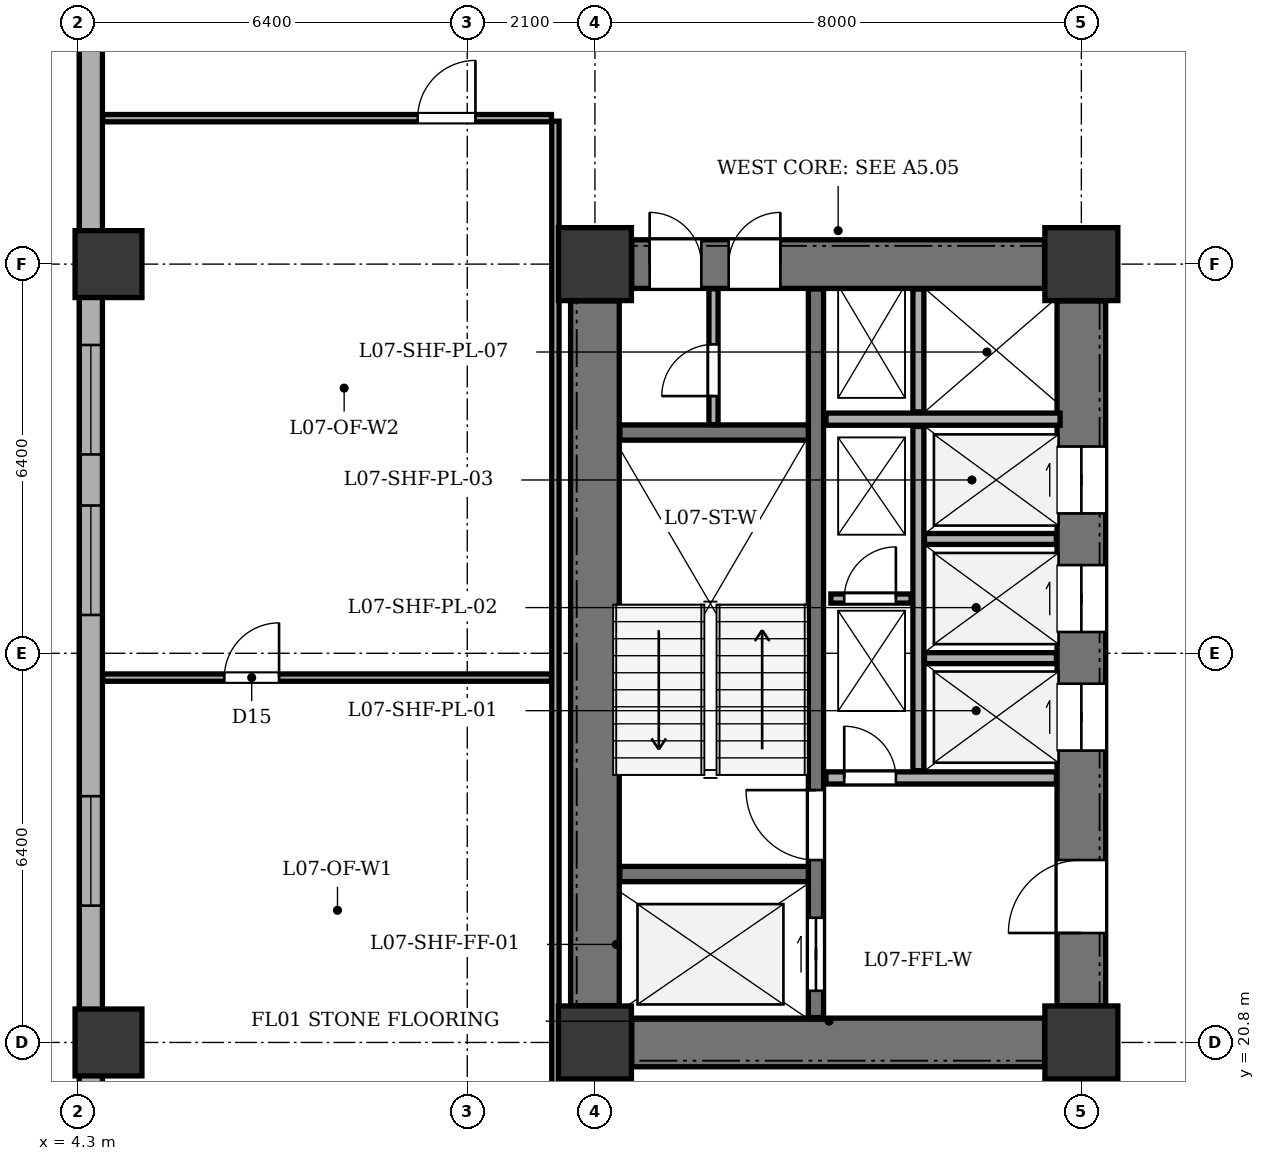
"""IFC4 building model, lengths in metres.
Left out: names, types, materials, properties, quantities, classifications, styles, units other than length and angle.
Written with IfcOpenShell. Run it as: python <this file> out.ifc"""

import sys

from ifc_helpers import new_model, si_unit, direction, frame, frame_2d, origin, origin_2d, place, context, subcontext, project, spatial, rectangle, extrude, element, fill, save


model = new_model("IFC4")
c1 = context("Model", 3, precision=1e-05, world=origin(), true_north=direction((0.0, 1.0)))
c2 = subcontext(c1, "Body", "Model", "MODEL_VIEW")
j1 = project(units=[si_unit("LENGTHUNIT", "METRE"), si_unit("PLANEANGLEUNIT", "RADIAN")], contexts=[c1])
p1 = place(None, origin())
s1 = spatial("IfcSite", under=j1, at=p1, CompositionType="ELEMENT")
p2 = place(p1, origin())
s2 = spatial("IfcBuilding", under=s1, at=p2, CompositionType="ELEMENT")
p3 = place(p2, frame((0.0, 0.0, 32.1)))
s3 = spatial("IfcBuildingStorey", under=s2, at=p3, CompositionType="ELEMENT", Elevation=32.1)
for number, where, z_axis, x_axis in (
    (1, (12.8, 20.8, 0.0), (0.0, 0.0, 1.0), (1.0, 0.0, 0.0)),
    (2, (20.8, 20.8, 0.0), (0.0, 0.0, 1.0), (1.0, 0.0, 0.0)),
    (3, (12.8, 33.6, 0.0), (0.0, 0.0, 1.0), (1.0, 0.0, 0.0)),
    (4, (20.8, 33.6, 0.0), (0.0, 0.0, 1.0), (1.0, 0.0, 0.0)),
):
    element("IfcColumn", number, at=place(p3, frame(where, z_axis=z_axis, x_axis=x_axis)), inside=s3, PredefinedType="COLUMN", context=c2, shape_type="SweptSolid", body=[
        extrude(rectangle(XDim=1.2, YDim=1.2, at=origin_2d()), origin(), (0.0, 0.0, 1.0), 3.9),
    ])
for number, where, z_axis, x_axis in (
    (5, (4.8, 20.8, 0.0), (0.0, 0.0, 1.0), (1.0, 0.0, 0.0)),
    (6, (4.8, 33.6, 0.0), (0.0, 0.0, 1.0), (1.0, 0.0, 0.0)),
):
    element("IfcColumn", number, at=place(p3, frame(where, z_axis=z_axis, x_axis=x_axis)), inside=s3, PredefinedType="COLUMN", context=c2, shape_type="SweptSolid", body=[
        extrude(rectangle(XDim=1.1, YDim=1.1, at=origin_2d()), origin(), (0.0, 0.0, 1.0), 3.9),
    ])
p4 = place(p3, frame((4.51, 6.5, 0.0), z_axis=(0.0, 0.0, 1.0), x_axis=(0.0, 1.0, 0.0)))
e7 = element("IfcWall", 7, at=p4, inside=s3, PredefinedType="STANDARD", context=c2, shape_type="SweptSolid", body=[
    extrude(rectangle(XDim=35.0, YDim=0.38, at=frame_2d((17.5, 0.0))), origin(), (0.0, 0.0, 1.0), 3.135),
])
p5 = place(p4, frame((2.693, 0.0, 0.8)))
e8 = element("IfcOpeningElement", 8, at=p5, cuts=e7, PredefinedType="OPENING", context=c2, shape_type="SweptSolid", body=[
    extrude(rectangle(XDim=1.8, YDim=1.9, at=frame_2d((0.9, 0.95))), frame((0.0, 0.2, 0.0), z_axis=(0.0, -1.0, 0.0), x_axis=(1.0, 0.0, 0.0)), (0.0, 0.0, 1.0), 0.4),
])
p6 = place(p4, frame((7.457, 0.0, 0.8)))
e9 = element("IfcOpeningElement", 9, at=p6, cuts=e7, PredefinedType="OPENING", context=c2, shape_type="SweptSolid", body=[
    extrude(rectangle(XDim=2.4, YDim=1.9, at=frame_2d((1.2, 0.95))), frame((0.0, 0.2, 0.0), z_axis=(0.0, -1.0, 0.0), x_axis=(1.0, 0.0, 0.0)), (0.0, 0.0, 1.0), 0.4),
])
p7 = place(p4, frame((16.55, 0.0, 0.8)))
e10 = element("IfcOpeningElement", 10, at=p7, cuts=e7, PredefinedType="OPENING", context=c2, shape_type="SweptSolid", body=[
    extrude(rectangle(XDim=1.8, YDim=1.9, at=frame_2d((0.9, 0.95))), frame((0.0, 0.2, 0.0), z_axis=(0.0, -1.0, 0.0), x_axis=(1.0, 0.0, 0.0)), (0.0, 0.0, 1.0), 0.4),
])
p8 = place(p4, frame((21.33, 0.0, 0.8)))
e11 = element("IfcOpeningElement", 11, at=p8, cuts=e7, PredefinedType="OPENING", context=c2, shape_type="SweptSolid", body=[
    extrude(rectangle(XDim=1.8, YDim=1.9, at=frame_2d((0.9, 0.95))), frame((0.0, 0.2, 0.0), z_axis=(0.0, -1.0, 0.0), x_axis=(1.0, 0.0, 0.0)), (0.0, 0.0, 1.0), 0.4),
])
p9 = place(p4, frame((23.97, 0.0, 0.8)))
e12 = element("IfcOpeningElement", 12, at=p9, cuts=e7, PredefinedType="OPENING", context=c2, shape_type="SweptSolid", body=[
    extrude(rectangle(XDim=1.8, YDim=1.9, at=frame_2d((0.9, 0.95))), frame((0.0, 0.2, 0.0), z_axis=(0.0, -1.0, 0.0), x_axis=(1.0, 0.0, 0.0)), (0.0, 0.0, 1.0), 0.4),
])
p10 = place(p4, frame((31.175, 0.0, 0.8)))
e13 = element("IfcOpeningElement", 13, at=p10, cuts=e7, PredefinedType="OPENING", context=c2, shape_type="SweptSolid", body=[
    extrude(rectangle(XDim=1.8, YDim=1.9, at=frame_2d((0.9, 0.95))), frame((0.0, 0.2, 0.0), z_axis=(0.0, -1.0, 0.0), x_axis=(1.0, 0.0, 0.0)), (0.0, 0.0, 1.0), 0.4),
])
p11 = place(p3, frame((12.8, 21.405, 0.0), z_axis=(0.0, 0.0, 1.0), x_axis=(0.0, 1.0, 0.0)))
e14 = element("IfcWall", 14, at=p11, inside=s3, PredefinedType="SHEAR", context=c2, shape_type="SweptSolid", body=[
    extrude(rectangle(XDim=11.59, YDim=0.8, at=frame_2d((5.795, 0.0))), origin(), (0.0, 0.0, 1.0), 3.6),
])
p12 = place(p3, frame((13.405, 20.8, 0.0), z_axis=(0.0, 0.0, 1.0), x_axis=(1.0, 0.0, 0.0)))
e15 = element("IfcWall", 15, at=p12, inside=s3, PredefinedType="SHEAR", context=c2, shape_type="SweptSolid", body=[
    extrude(rectangle(XDim=6.79, YDim=0.8, at=frame_2d((3.395, 0.0))), origin(), (0.0, 0.0, 1.0), 3.6),
])
p13 = place(p3, frame((13.405, 33.6, 0.0), z_axis=(0.0, 0.0, 1.0), x_axis=(1.0, 0.0, 0.0)))
e16 = element("IfcWall", 16, at=p13, inside=s3, PredefinedType="SHEAR", context=c2, shape_type="SweptSolid", body=[
    extrude(rectangle(XDim=6.79, YDim=0.8, at=frame_2d((3.395, 0.0))), origin(), (0.0, 0.0, 1.0), 3.6),
])
p14 = place(p13, frame((0.295, 0.0, 0.0)))
e17 = element("IfcOpeningElement", 17, at=p14, cuts=e16, PredefinedType="OPENING", context=c2, shape_type="SweptSolid", body=[
    extrude(rectangle(XDim=0.85, YDim=2.02, at=frame_2d((0.425, 1.01))), frame((0.0, 0.41, 0.0), z_axis=(0.0, -1.0, 0.0), x_axis=(1.0, 0.0, 0.0)), (0.0, 0.0, 1.0), 0.82),
])
p15 = place(p13, frame((1.595, 0.0, 0.0)))
e18 = element("IfcOpeningElement", 18, at=p15, cuts=e16, PredefinedType="OPENING", context=c2, shape_type="SweptSolid", body=[
    extrude(rectangle(XDim=0.85, YDim=2.02, at=frame_2d((0.425, 1.01))), frame((0.0, 0.41, 0.0), z_axis=(0.0, -1.0, 0.0), x_axis=(1.0, 0.0, 0.0)), (0.0, 0.0, 1.0), 0.82),
])
p16 = place(p3, frame((20.8, 21.405, 0.0), z_axis=(0.0, 0.0, 1.0), x_axis=(0.0, 1.0, 0.0)))
e19 = element("IfcWall", 19, at=p16, inside=s3, PredefinedType="SHEAR", context=c2, shape_type="SweptSolid", body=[
    extrude(rectangle(XDim=11.59, YDim=0.8, at=frame_2d((5.795, 0.0))), origin(), (0.0, 0.0, 1.0), 3.6),
])
p17 = place(p16, frame((1.195, 0.0, 0.0)))
e20 = element("IfcOpeningElement", 20, at=p17, cuts=e19, PredefinedType="OPENING", context=c2, shape_type="SweptSolid", body=[
    extrude(rectangle(XDim=1.2, YDim=2.15, at=frame_2d((0.6, 1.075))), frame((0.0, 0.41, 0.0), z_axis=(0.0, -1.0, 0.0), x_axis=(1.0, 0.0, 0.0)), (0.0, 0.0, 1.0), 0.82),
])
p18 = place(p16, frame((4.195, 0.0, 0.0)))
e21 = element("IfcOpeningElement", 21, at=p18, cuts=e19, PredefinedType="OPENING", context=c2, shape_type="SweptSolid", body=[
    extrude(rectangle(XDim=1.1, YDim=2.1, at=frame_2d((0.55, 1.05))), frame((0.0, 0.41, 0.0), z_axis=(0.0, -1.0, 0.0), x_axis=(1.0, 0.0, 0.0)), (0.0, 0.0, 1.0), 0.82),
])
p19 = place(p16, frame((6.145, 0.0, 0.0)))
e22 = element("IfcOpeningElement", 22, at=p19, cuts=e19, PredefinedType="OPENING", context=c2, shape_type="SweptSolid", body=[
    extrude(rectangle(XDim=1.1, YDim=2.1, at=frame_2d((0.55, 1.05))), frame((0.0, 0.41, 0.0), z_axis=(0.0, -1.0, 0.0), x_axis=(1.0, 0.0, 0.0)), (0.0, 0.0, 1.0), 0.82),
])
p20 = place(p16, frame((8.095, 0.0, 0.0)))
e23 = element("IfcOpeningElement", 23, at=p20, cuts=e19, PredefinedType="OPENING", context=c2, shape_type="SweptSolid", body=[
    extrude(rectangle(XDim=1.1, YDim=2.1, at=frame_2d((0.55, 1.05))), frame((0.0, 0.41, 0.0), z_axis=(0.0, -1.0, 0.0), x_axis=(1.0, 0.0, 0.0)), (0.0, 0.0, 1.0), 0.82),
])
p21 = place(p3, frame((16.435, 21.21, 0.0), z_axis=(0.0, 0.0, 1.0), x_axis=(0.0, 1.0, 0.0)))
e24 = element("IfcWall", 24, at=p21, inside=s3, PredefinedType="SHEAR", context=c2, shape_type="SweptSolid", body=[
    extrude(rectangle(XDim=11.98, YDim=0.25, at=frame_2d((5.99, 0.0))), origin(), (0.0, 0.0, 1.0), 3.6),
])
p22 = place(p21, frame((0.44, 0.0, 0.0)))
e25 = element("IfcOpeningElement", 25, at=p22, cuts=e24, PredefinedType="OPENING", context=c2, shape_type="SweptSolid", body=[
    extrude(rectangle(XDim=1.2, YDim=2.15, at=frame_2d((0.6, 1.075))), frame((0.0, 0.135, 0.0), z_axis=(0.0, -1.0, 0.0), x_axis=(1.0, 0.0, 0.0)), (0.0, 0.0, 1.0), 0.27),
])
p23 = place(p21, frame((2.59, 0.0, 0.0)))
e26 = element("IfcOpeningElement", 26, at=p23, cuts=e24, PredefinedType="OPENING", context=c2, shape_type="SweptSolid", body=[
    extrude(rectangle(XDim=1.15, YDim=2.15, at=frame_2d((0.575, 1.075))), frame((0.0, 0.135, 0.0), z_axis=(0.0, -1.0, 0.0), x_axis=(1.0, 0.0, 0.0)), (0.0, 0.0, 1.0), 0.27),
])
for number, where, z_axis, x_axis in (
    (27, (13.21, 23.57, 0.0), (0.0, 0.0, 1.0), (1.0, 0.0, 0.0)),
    (28, (13.21, 30.83, 0.0), (0.0, 0.0, 1.0), (1.0, 0.0, 0.0)),
):
    element("IfcWall", number, at=place(p3, frame(where, z_axis=z_axis, x_axis=x_axis)), inside=s3, PredefinedType="SHEAR", context=c2, shape_type="SweptSolid", body=[
        extrude(rectangle(XDim=3.1, YDim=0.25, at=frame_2d((1.55, 0.0))), origin(), (0.0, 0.0, 1.0), 3.6),
    ])
p24 = place(p3, frame((16.6, 25.15, 0.0), z_axis=(0.0, 0.0, 1.0), x_axis=(1.0, 0.0, 0.0)))
e29 = element("IfcWall", 29, at=p24, inside=s3, PredefinedType="SOLIDWALL", context=c2, shape_type="SweptSolid", body=[
    extrude(rectangle(XDim=3.79, YDim=0.2, at=frame_2d((1.895, 0.0))), origin(), (0.0, 0.0, 1.0), 3.6),
])
p25 = place(p24, frame((0.3, 0.0, 0.0)))
e30 = element("IfcOpeningElement", 30, at=p25, cuts=e29, PredefinedType="OPENING", context=c2, shape_type="SweptSolid", body=[
    extrude(rectangle(XDim=0.85, YDim=2.02, at=frame_2d((0.425, 1.01))), frame((0.0, 0.11, 0.0), z_axis=(0.0, -1.0, 0.0), x_axis=(1.0, 0.0, 0.0)), (0.0, 0.0, 1.0), 0.22),
])
p26 = place(p3, frame((16.6, 31.05, 0.0), z_axis=(0.0, 0.0, 1.0), x_axis=(1.0, 0.0, 0.0)))
e31 = element("IfcWall", 31, at=p26, inside=s3, PredefinedType="SOLIDWALL", context=c2, shape_type="SweptSolid", body=[
    extrude(rectangle(XDim=3.85, YDim=0.2, at=frame_2d((1.925, 0.0))), origin(), (0.0, 0.0, 1.0), 3.6),
])
p27 = place(p3, frame((18.12, 25.27, 0.0), z_axis=(0.0, 0.0, 1.0), x_axis=(0.0, 1.0, 0.0)))
e32 = element("IfcWall", 32, at=p27, inside=s3, PredefinedType="PARTITIONING", context=c2, shape_type="SweptSolid", body=[
    extrude(rectangle(XDim=5.66, YDim=0.18, at=frame_2d((2.83, 0.0))), origin(), (0.0, 0.0, 1.0), 3.6),
])
p28 = place(p3, frame((18.12, 31.17, 0.0), z_axis=(0.0, 0.0, 1.0), x_axis=(0.0, 1.0, 0.0)))
e33 = element("IfcWall", 33, at=p28, inside=s3, PredefinedType="PARTITIONING", context=c2, shape_type="SweptSolid", body=[
    extrude(rectangle(XDim=2.02, YDim=0.18, at=frame_2d((1.01, 0.0))), origin(), (0.0, 0.0, 1.0), 3.6),
])
for number, where, z_axis, x_axis in (
    (34, (18.22, 27.12, 0.0), (0.0, 0.0, 1.0), (1.0, 0.0, 0.0)),
    (35, (18.22, 29.08, 0.0), (0.0, 0.0, 1.0), (1.0, 0.0, 0.0)),
):
    element("IfcWall", number, at=place(p3, frame(where, z_axis=z_axis, x_axis=x_axis)), inside=s3, PredefinedType="PARTITIONING", context=c2, shape_type="SweptSolid", body=[
        extrude(rectangle(XDim=2.17, YDim=0.18, at=frame_2d((1.085, 0.0))), origin(), (0.0, 0.0, 1.0), 3.6),
    ])
p29 = place(p3, frame((14.75, 30.96, 0.0), z_axis=(0.0, 0.0, 1.0), x_axis=(0.0, 1.0, 0.0)))
e36 = element("IfcWall", 36, at=p29, inside=s3, PredefinedType="PARTITIONING", context=c2, shape_type="SweptSolid", body=[
    extrude(rectangle(XDim=2.235, YDim=0.15, at=frame_2d((1.118, 0.0))), origin(), (0.0, 0.0, 1.0), 3.6),
])
p30 = place(p29, frame((0.47, 0.0, 0.0)))
e37 = element("IfcOpeningElement", 37, at=p30, cuts=e36, PredefinedType="OPENING", context=c2, shape_type="SweptSolid", body=[
    extrude(rectangle(XDim=0.85, YDim=2.02, at=frame_2d((0.425, 1.01))), frame((0.0, 0.085, 0.0), z_axis=(0.0, -1.0, 0.0), x_axis=(1.0, 0.0, 0.0)), (0.0, 0.0, 1.0), 0.17),
])
p31 = place(p3, frame((16.68, 28.1, 0.0), z_axis=(0.0, 0.0, 1.0), x_axis=(1.0, 0.0, 0.0)))
e38 = element("IfcWall", 38, at=p31, inside=s3, PredefinedType="PARTITIONING", context=c2, shape_type="SweptSolid", body=[
    extrude(rectangle(XDim=1.32, YDim=0.15, at=frame_2d((0.66, 0.0))), origin(), (0.0, 0.0, 1.0), 3.6),
])
p32 = place(p31, frame((0.22, 0.0, 0.0)))
e39 = element("IfcOpeningElement", 39, at=p32, cuts=e38, PredefinedType="OPENING", context=c2, shape_type="SweptSolid", body=[
    extrude(rectangle(XDim=0.85, YDim=2.02, at=frame_2d((0.425, 1.01))), frame((0.0, 0.085, 0.0), z_axis=(0.0, -1.0, 0.0), x_axis=(1.0, 0.0, 0.0)), (0.0, 0.0, 1.0), 0.17),
])
p33 = place(p3, frame((12.15, 18.45, 0.0), z_axis=(0.0, 0.0, 1.0), x_axis=(0.0, 1.0, 0.0)))
e40 = element("IfcWall", 40, at=p33, inside=s3, PredefinedType="PARTITIONING", context=c2, shape_type="SweptSolid", body=[
    extrude(rectangle(XDim=17.5, YDim=0.12, at=frame_2d((8.75, 0.0))), origin(), (0.0, 0.0, 1.0), 3.6),
])
p34 = place(p3, frame((4.705, 36.0, 0.0), z_axis=(0.0, 0.0, 1.0), x_axis=(1.0, 0.0, 0.0)))
e41 = element("IfcWall", 41, at=p34, inside=s3, PredefinedType="PARTITIONING", context=c2, shape_type="SweptSolid", body=[
    extrude(rectangle(XDim=7.38, YDim=0.12, at=frame_2d((3.69, 0.0))), origin(), (0.0, 0.0, 1.0), 3.6),
])
p35 = place(p34, frame((5.18, 0.0, 0.0)))
e42 = element("IfcOpeningElement", 42, at=p35, cuts=e41, PredefinedType="OPENING", context=c2, shape_type="SweptSolid", body=[
    extrude(rectangle(XDim=0.95, YDim=2.1, at=frame_2d((0.475, 1.05))), frame((0.0, 0.07, 0.0), z_axis=(0.0, -1.0, 0.0), x_axis=(1.0, 0.0, 0.0)), (0.0, 0.0, 1.0), 0.14),
])
p36 = place(p3, frame((4.705, 26.8, 0.0), z_axis=(0.0, 0.0, 1.0), x_axis=(1.0, 0.0, 0.0)))
e43 = element("IfcWall", 43, at=p36, inside=s3, PredefinedType="PARTITIONING", context=c2, shape_type="SweptSolid", body=[
    extrude(rectangle(XDim=7.38, YDim=0.12, at=frame_2d((3.69, 0.0))), origin(), (0.0, 0.0, 1.0), 3.6),
])
p37 = place(p36, frame((2.0, 0.0, 0.0)))
e44 = element("IfcOpeningElement", 44, at=p37, cuts=e43, PredefinedType="OPENING", context=c2, shape_type="SweptSolid", body=[
    extrude(rectangle(XDim=0.9, YDim=2.05, at=frame_2d((0.45, 1.025))), frame((0.0, 0.07, 0.0), z_axis=(0.0, -1.0, 0.0), x_axis=(1.0, 0.0, 0.0)), (0.0, 0.0, 1.0), 0.14),
])
p38 = place(p7, origin())
e45 = element("IfcWindow", 45, at=p38, inside=s3, PartitioningType="SINGLE_PANEL", PredefinedType="WINDOW", context=c2, shape_type="SweptSolid", body=[
    extrude(rectangle(XDim=1.8, YDim=1.9, at=frame_2d((0.9, 0.95))), frame((0.0, -0.01, 0.0), z_axis=(0.0, -1.0, 0.0), x_axis=(1.0, 0.0, 0.0)), (0.0, 0.0, 1.0), 0.06),
])
fill(e10, e45)
p39 = place(p8, origin())
e46 = element("IfcWindow", 46, at=p39, inside=s3, PartitioningType="SINGLE_PANEL", PredefinedType="WINDOW", context=c2, shape_type="SweptSolid", body=[
    extrude(rectangle(XDim=1.8, YDim=1.9, at=frame_2d((0.9, 0.95))), frame((0.0, -0.01, 0.0), z_axis=(0.0, -1.0, 0.0), x_axis=(1.0, 0.0, 0.0)), (0.0, 0.0, 1.0), 0.06),
])
fill(e11, e46)
p40 = place(p9, origin())
e47 = element("IfcWindow", 47, at=p40, inside=s3, PartitioningType="SINGLE_PANEL", PredefinedType="WINDOW", context=c2, shape_type="SweptSolid", body=[
    extrude(rectangle(XDim=1.8, YDim=1.9, at=frame_2d((0.9, 0.95))), frame((0.0, -0.01, 0.0), z_axis=(0.0, -1.0, 0.0), x_axis=(1.0, 0.0, 0.0)), (0.0, 0.0, 1.0), 0.06),
])
fill(e12, e47)
p41 = place(p14, origin())
e48 = element("IfcDoor", 48, at=p41, inside=s3, OperationType="SINGLE_SWING_LEFT", PredefinedType="DOOR", context=c2, shape_type="SweptSolid", body=[
    extrude(rectangle(XDim=0.85, YDim=2.02, at=frame_2d((0.425, 1.01))), frame((0.0, 0.025, 0.0), z_axis=(0.0, -1.0, 0.0), x_axis=(1.0, 0.0, 0.0)), (0.0, 0.0, 1.0), 0.05),
])
fill(e17, e48)
p42 = place(p15, origin())
e49 = element("IfcDoor", 49, at=p42, inside=s3, OperationType="SINGLE_SWING_RIGHT", PredefinedType="DOOR", context=c2, shape_type="SweptSolid", body=[
    extrude(rectangle(XDim=0.85, YDim=2.02, at=frame_2d((0.425, 1.01))), frame((0.0, 0.025, 0.0), z_axis=(0.0, -1.0, 0.0), x_axis=(1.0, 0.0, 0.0)), (0.0, 0.0, 1.0), 0.05),
])
fill(e18, e49)
p43 = place(p17, origin())
e50 = element("IfcDoor", 50, at=p43, inside=s3, OperationType="SINGLE_SWING_LEFT", PredefinedType="DOOR", context=c2, shape_type="SweptSolid", body=[
    extrude(rectangle(XDim=1.2, YDim=2.15, at=frame_2d((0.6, 1.075))), frame((0.0, 0.025, 0.0), z_axis=(0.0, -1.0, 0.0), x_axis=(1.0, 0.0, 0.0)), (0.0, 0.0, 1.0), 0.05),
])
fill(e20, e50)
p44 = place(p18, origin())
e51 = element("IfcDoor", 51, at=p44, inside=s3, OperationType="DOUBLE_DOOR_SLIDING", PredefinedType="DOOR", context=c2, shape_type="SweptSolid", body=[
    extrude(rectangle(XDim=1.1, YDim=2.1, at=frame_2d((0.55, 1.05))), frame((0.0, 0.025, 0.0), z_axis=(0.0, -1.0, 0.0), x_axis=(1.0, 0.0, 0.0)), (0.0, 0.0, 1.0), 0.05),
])
fill(e21, e51)
p45 = place(p19, origin())
e52 = element("IfcDoor", 52, at=p45, inside=s3, OperationType="DOUBLE_DOOR_SLIDING", PredefinedType="DOOR", context=c2, shape_type="SweptSolid", body=[
    extrude(rectangle(XDim=1.1, YDim=2.1, at=frame_2d((0.55, 1.05))), frame((0.0, 0.025, 0.0), z_axis=(0.0, -1.0, 0.0), x_axis=(1.0, 0.0, 0.0)), (0.0, 0.0, 1.0), 0.05),
])
fill(e22, e52)
p46 = place(p20, origin())
e53 = element("IfcDoor", 53, at=p46, inside=s3, OperationType="DOUBLE_DOOR_SLIDING", PredefinedType="DOOR", context=c2, shape_type="SweptSolid", body=[
    extrude(rectangle(XDim=1.1, YDim=2.1, at=frame_2d((0.55, 1.05))), frame((0.0, 0.025, 0.0), z_axis=(0.0, -1.0, 0.0), x_axis=(1.0, 0.0, 0.0)), (0.0, 0.0, 1.0), 0.05),
])
fill(e23, e53)
p47 = place(p22, origin())
e54 = element("IfcDoor", 54, at=p47, inside=s3, OperationType="DOUBLE_DOOR_SLIDING", PredefinedType="DOOR", context=c2, shape_type="SweptSolid", body=[
    extrude(rectangle(XDim=1.2, YDim=2.15, at=frame_2d((0.6, 1.075))), frame((0.0, 0.025, 0.0), z_axis=(0.0, -1.0, 0.0), x_axis=(1.0, 0.0, 0.0)), (0.0, 0.0, 1.0), 0.05),
])
fill(e25, e54)
p48 = place(p23, origin())
e55 = element("IfcDoor", 55, at=p48, inside=s3, OperationType="SINGLE_SWING_RIGHT", PredefinedType="DOOR", context=c2, shape_type="SweptSolid", body=[
    extrude(rectangle(XDim=1.15, YDim=2.15, at=frame_2d((0.575, 1.075))), frame((0.0, 0.025, 0.0), z_axis=(0.0, -1.0, 0.0), x_axis=(1.0, 0.0, 0.0)), (0.0, 0.0, 1.0), 0.05),
])
fill(e26, e55)
p49 = place(p25, origin())
e56 = element("IfcDoor", 56, at=p49, inside=s3, OperationType="SINGLE_SWING_LEFT", PredefinedType="DOOR", context=c2, shape_type="SweptSolid", body=[
    extrude(rectangle(XDim=0.85, YDim=2.02, at=frame_2d((0.425, 1.01))), frame((0.0, 0.025, 0.0), z_axis=(0.0, -1.0, 0.0), x_axis=(1.0, 0.0, 0.0)), (0.0, 0.0, 1.0), 0.05),
])
fill(e30, e56)
p50 = place(p30, origin())
e57 = element("IfcDoor", 57, at=p50, inside=s3, OperationType="SINGLE_SWING_LEFT", PredefinedType="DOOR", context=c2, shape_type="SweptSolid", body=[
    extrude(rectangle(XDim=0.85, YDim=2.02, at=frame_2d((0.425, 1.01))), frame((0.0, 0.025, 0.0), z_axis=(0.0, -1.0, 0.0), x_axis=(1.0, 0.0, 0.0)), (0.0, 0.0, 1.0), 0.05),
])
fill(e37, e57)
p51 = place(p32, origin())
e58 = element("IfcDoor", 58, at=p51, inside=s3, OperationType="SINGLE_SWING_RIGHT", PredefinedType="DOOR", context=c2, shape_type="SweptSolid", body=[
    extrude(rectangle(XDim=0.85, YDim=2.02, at=frame_2d((0.425, 1.01))), frame((0.0, 0.025, 0.0), z_axis=(0.0, -1.0, 0.0), x_axis=(1.0, 0.0, 0.0)), (0.0, 0.0, 1.0), 0.05),
])
fill(e39, e58)
p52 = place(p37, origin())
e59 = element("IfcDoor", 59, at=p52, inside=s3, OperationType="SINGLE_SWING_RIGHT", PredefinedType="DOOR", context=c2, shape_type="SweptSolid", body=[
    extrude(rectangle(XDim=0.9, YDim=2.05, at=frame_2d((0.45, 1.025))), frame((0.0, 0.025, 0.0), z_axis=(0.0, -1.0, 0.0), x_axis=(1.0, 0.0, 0.0)), (0.0, 0.0, 1.0), 0.05),
])
fill(e44, e59)
p53 = place(p35, origin())
e60 = element("IfcDoor", 60, at=p53, inside=s3, OperationType="SINGLE_SWING_RIGHT", PredefinedType="DOOR", context=c2, shape_type="SweptSolid", body=[
    extrude(rectangle(XDim=0.95, YDim=2.1, at=frame_2d((0.475, 1.05))), frame((0.0, 0.025, 0.0), z_axis=(0.0, -1.0, 0.0), x_axis=(1.0, 0.0, 0.0)), (0.0, 0.0, 1.0), 0.05),
])
fill(e42, e60)
save(model, sys.argv[1])
